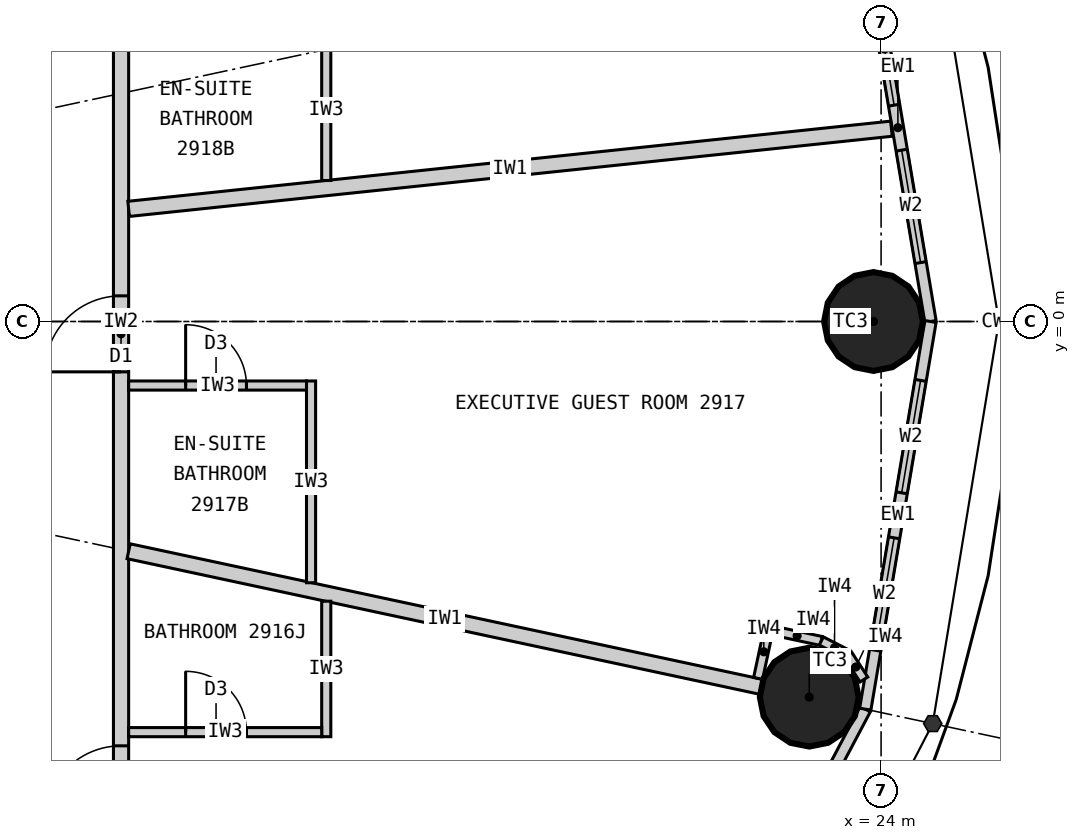
"""IFC4 building model, lengths in metres.
Left out: names, types, materials, properties, quantities, classifications, styles, units other than length and angle.
Written with IfcOpenShell. Run it as: python <this file> out.ifc"""

import sys

from ifc_helpers import new_model, si_unit, direction, frame, frame_2d, origin, origin_2d, place, context, subcontext, project, spatial, rectangle, circle, extrude, element, fill, save


model = new_model("IFC4")
c1 = context("Model", 3, precision=1e-05, world=origin(), true_north=direction((0.0, 1.0)))
c2 = subcontext(c1, "Body", "Model", "MODEL_VIEW")
j1 = project(units=[si_unit("LENGTHUNIT", "METRE"), si_unit("PLANEANGLEUNIT", "RADIAN")], contexts=[c1])
p1 = place(None, origin())
s1 = spatial("IfcSite", under=j1, at=p1, CompositionType="ELEMENT")
p2 = place(p1, origin())
s2 = spatial("IfcBuilding", under=s1, at=p2, CompositionType="ELEMENT")
p3 = place(p2, frame((0.0, 0.0, 115.5)))
s3 = spatial("IfcBuildingStorey", under=s2, at=p3, CompositionType="ELEMENT", Elevation=115.5)
for number, where, z_axis, x_axis in (
    (1, (23.9, 0.0, 0.0), (0.0, 0.0, 1.0), (1.0, 0.0, 0.0)),
    (2, (23.055, -4.942, 0.0), (0.0, 0.0, 1.0), (1.0, 0.0, 0.0)),
):
    element("IfcColumn", number, at=place(p3, frame(where, z_axis=z_axis, x_axis=x_axis)), inside=s3, PredefinedType="COLUMN", context=c2, shape_type="SweptSolid", body=[
        extrude(circle(Radius=0.65, at=origin_2d()), origin(), (0.0, 0.0, 1.0), 3.3),
    ])
p4 = place(p3, frame((24.65, 0.0, 0.0), z_axis=(0.0, 0.0, 1.0), x_axis=(-0.165883894218, 0.986145290329, 0.0)))
e3 = element("IfcWall", 3, at=p4, inside=s3, PredefinedType="ELEMENTEDWALL", context=c2, shape_type="SweptSolid", body=[
    extrude(rectangle(XDim=5.172, YDim=0.15, at=frame_2d((2.586, 0.0))), origin(), (0.0, 0.0, 1.0), 3.12),
])
p5 = place(p4, frame((0.786, 0.0, 0.9)))
e4 = element("IfcOpeningElement", 4, at=p5, cuts=e3, PredefinedType="OPENING", context=c2, shape_type="SweptSolid", body=[
    extrude(rectangle(XDim=1.5, YDim=1.9, at=frame_2d((0.75, 0.95))), frame((0.0, 0.085, 0.0), z_axis=(0.0, -1.0, 0.0), x_axis=(1.0, 0.0, 0.0)), (0.0, 0.0, 1.0), 0.17),
])
p6 = place(p4, frame((2.886, 0.0, 0.9)))
e5 = element("IfcOpeningElement", 5, at=p6, cuts=e3, PredefinedType="OPENING", context=c2, shape_type="SweptSolid", body=[
    extrude(rectangle(XDim=1.5, YDim=1.9, at=frame_2d((0.75, 0.95))), frame((0.0, 0.085, 0.0), z_axis=(0.0, -1.0, 0.0), x_axis=(1.0, 0.0, 0.0)), (0.0, 0.0, 1.0), 0.17),
])
p7 = place(p3, frame((21.287, -9.832, 0.0), z_axis=(0.0, 0.0, 1.0), x_axis=(0.467814388454, 0.883826735257, 0.0)))
e6 = element("IfcWall", 6, at=p7, inside=s3, PredefinedType="ELEMENTEDWALL", context=c2, shape_type="SweptSolid", body=[
    extrude(rectangle(XDim=5.354, YDim=0.15, at=frame_2d((2.677, 0.0))), origin(), (0.0, 0.0, 1.0), 3.12),
])
p8 = place(p7, frame((0.877, 0.0, 0.9)))
e7 = element("IfcOpeningElement", 7, at=p8, cuts=e6, PredefinedType="OPENING", context=c2, shape_type="SweptSolid", body=[
    extrude(rectangle(XDim=1.5, YDim=1.9, at=frame_2d((0.75, 0.95))), frame((0.0, 0.085, 0.0), z_axis=(0.0, -1.0, 0.0), x_axis=(1.0, 0.0, 0.0)), (0.0, 0.0, 1.0), 0.17),
])
p9 = place(p7, frame((2.977, 0.0, 0.9)))
e8 = element("IfcOpeningElement", 8, at=p9, cuts=e6, PredefinedType="OPENING", context=c2, shape_type="SweptSolid", body=[
    extrude(rectangle(XDim=1.5, YDim=1.9, at=frame_2d((0.75, 0.95))), frame((0.0, 0.085, 0.0), z_axis=(0.0, -1.0, 0.0), x_axis=(1.0, 0.0, 0.0)), (0.0, 0.0, 1.0), 0.17),
])
p10 = place(p3, frame((23.792, -5.1, 0.0), z_axis=(0.0, 0.0, 1.0), x_axis=(0.165883894218, 0.986145290329, 0.0)))
e9 = element("IfcWall", 9, at=p10, inside=s3, PredefinedType="ELEMENTEDWALL", context=c2, shape_type="SweptSolid", body=[
    extrude(rectangle(XDim=5.172, YDim=0.15, at=frame_2d((2.586, 0.0))), origin(), (0.0, 0.0, 1.0), 3.12),
])
p11 = place(p10, frame((0.786, 0.0, 0.9)))
e10 = element("IfcOpeningElement", 10, at=p11, cuts=e9, PredefinedType="OPENING", context=c2, shape_type="SweptSolid", body=[
    extrude(rectangle(XDim=1.5, YDim=1.9, at=frame_2d((0.75, 0.95))), frame((0.0, 0.085, 0.0), z_axis=(0.0, -1.0, 0.0), x_axis=(1.0, 0.0, 0.0)), (0.0, 0.0, 1.0), 0.17),
])
p12 = place(p10, frame((2.886, 0.0, 0.9)))
e11 = element("IfcOpeningElement", 11, at=p12, cuts=e9, PredefinedType="OPENING", context=c2, shape_type="SweptSolid", body=[
    extrude(rectangle(XDim=1.5, YDim=1.9, at=frame_2d((0.75, 0.95))), frame((0.0, 0.085, 0.0), z_axis=(0.0, -1.0, 0.0), x_axis=(1.0, 0.0, 0.0)), (0.0, 0.0, 1.0), 0.17),
])
p13 = place(p3, frame((14.0, -9.9, 0.0), z_axis=(0.0, 0.0, 1.0), x_axis=(0.0, 1.0, 0.0)))
e12 = element("IfcWall", 12, at=p13, inside=s3, PredefinedType="PARTITIONING", context=c2, shape_type="SweptSolid", body=[
    extrude(rectangle(XDim=19.8, YDim=0.2, at=frame_2d((9.9, 0.0))), origin(), (0.0, 0.0, 1.0), 3.12),
])
p14 = place(p13, frame((3.318, 0.0, 0.0)))
e13 = element("IfcOpeningElement", 13, at=p14, cuts=e12, PredefinedType="OPENING", context=c2, shape_type="SweptSolid", body=[
    extrude(rectangle(XDim=1.0, YDim=2.2, at=frame_2d((0.5, 1.1))), frame((0.0, 0.11, 0.0), z_axis=(0.0, -1.0, 0.0), x_axis=(1.0, 0.0, 0.0)), (0.0, 0.0, 1.0), 0.22),
])
p15 = place(p13, frame((9.238, 0.0, 0.0)))
e14 = element("IfcOpeningElement", 14, at=p15, cuts=e12, PredefinedType="OPENING", context=c2, shape_type="SweptSolid", body=[
    extrude(rectangle(XDim=1.0, YDim=2.2, at=frame_2d((0.5, 1.1))), frame((0.0, 0.11, 0.0), z_axis=(0.0, -1.0, 0.0), x_axis=(1.0, 0.0, 0.0)), (0.0, 0.0, 1.0), 0.22),
])
p16 = place(p13, frame((13.742, 0.0, 0.0)))
e15 = element("IfcOpeningElement", 15, at=p16, cuts=e12, PredefinedType="OPENING", context=c2, shape_type="SweptSolid", body=[
    extrude(rectangle(XDim=1.0, YDim=2.2, at=frame_2d((0.5, 1.1))), frame((0.0, 0.11, 0.0), z_axis=(0.0, -1.0, 0.0), x_axis=(1.0, 0.0, 0.0)), (0.0, 0.0, 1.0), 0.22),
])
p17 = place(p13, frame((18.698, 0.0, 0.0)))
e16 = element("IfcOpeningElement", 16, at=p17, cuts=e12, PredefinedType="OPENING", context=c2, shape_type="SweptSolid", body=[
    extrude(rectangle(XDim=1.0, YDim=2.2, at=frame_2d((0.5, 1.1))), frame((0.0, 0.11, 0.0), z_axis=(0.0, -1.0, 0.0), x_axis=(1.0, 0.0, 0.0)), (0.0, 0.0, 1.0), 0.22),
])
p18 = place(p3, frame((14.1, 1.482, 0.0), z_axis=(0.0, 0.0, 1.0), x_axis=(0.994523202615, 0.104516024894, 0.0)))
e17 = element("IfcWall", 17, at=p18, inside=s3, PredefinedType="PARTITIONING", context=c2, shape_type="SweptSolid", body=[
    extrude(rectangle(XDim=10.091, YDim=0.2, at=frame_2d((5.045, 0.0))), origin(), (0.0, 0.0, 1.0), 2.47),
])
p19 = place(p3, frame((14.1, -3.022, 0.0), z_axis=(0.0, 0.0, 1.0), x_axis=(0.977783513367, -0.209617272638, 0.0)))
e18 = element("IfcWall", 18, at=p19, inside=s3, PredefinedType="PARTITIONING", context=c2, shape_type="SweptSolid", body=[
    extrude(rectangle(XDim=8.508, YDim=0.2, at=frame_2d((4.254, 0.0))), origin(), (0.0, 0.0, 1.0), 2.37),
])
p20 = place(p3, frame((16.7, -3.68, 0.0), z_axis=(0.0, 0.0, 1.0), x_axis=(0.0, -1.0, 0.0)))
e19 = element("IfcWall", 19, at=p20, inside=s3, PredefinedType="PARTITIONING", context=c2, shape_type="SweptSolid", body=[
    extrude(rectangle(XDim=1.783, YDim=0.12, at=frame_2d((0.891, 0.0))), origin(), (0.0, 0.0, 1.0), 3.12),
])
p21 = place(p3, frame((14.1, -5.403, 0.0), z_axis=(0.0, 0.0, 1.0), x_axis=(1.0, 0.0, 0.0)))
e20 = element("IfcWall", 20, at=p21, inside=s3, PredefinedType="PARTITIONING", context=c2, shape_type="SweptSolid", body=[
    extrude(rectangle(XDim=2.54, YDim=0.12, at=frame_2d((1.27, 0.0))), origin(), (0.0, 0.0, 1.0), 3.12),
])
p22 = place(p21, frame((0.75, 0.0, 0.0)))
e21 = element("IfcOpeningElement", 21, at=p22, cuts=e20, PredefinedType="OPENING", context=c2, shape_type="SweptSolid", body=[
    extrude(rectangle(XDim=0.8, YDim=2.1, at=frame_2d((0.4, 1.05))), frame((0.0, 0.07, 0.0), z_axis=(0.0, -1.0, 0.0), x_axis=(1.0, 0.0, 0.0)), (0.0, 0.0, 1.0), 0.14),
])
p23 = place(p3, frame((16.5, -3.437, 0.0), z_axis=(0.0, 0.0, 1.0), x_axis=(0.0, 1.0, 0.0)))
e22 = element("IfcWall", 22, at=p23, inside=s3, PredefinedType="PARTITIONING", context=c2, shape_type="SweptSolid", body=[
    extrude(rectangle(XDim=2.655, YDim=0.12, at=frame_2d((1.327, 0.0))), origin(), (0.0, 0.0, 1.0), 3.12),
])
p24 = place(p3, frame((14.1, -0.843, 0.0), z_axis=(0.0, 0.0, 1.0), x_axis=(1.0, 0.0, 0.0)))
e23 = element("IfcWall", 23, at=p24, inside=s3, PredefinedType="PARTITIONING", context=c2, shape_type="SweptSolid", body=[
    extrude(rectangle(XDim=2.34, YDim=0.12, at=frame_2d((1.17, 0.0))), origin(), (0.0, 0.0, 1.0), 3.12),
])
p25 = place(p24, frame((0.75, 0.0, 0.0)))
e24 = element("IfcOpeningElement", 24, at=p25, cuts=e23, PredefinedType="OPENING", context=c2, shape_type="SweptSolid", body=[
    extrude(rectangle(XDim=0.8, YDim=2.1, at=frame_2d((0.4, 1.05))), frame((0.0, 0.07, 0.0), z_axis=(0.0, -1.0, 0.0), x_axis=(1.0, 0.0, 0.0)), (0.0, 0.0, 1.0), 0.14),
])
p26 = place(p3, frame((16.7, 1.855, 0.0), z_axis=(0.0, 0.0, 1.0), x_axis=(0.0, 1.0, 0.0)))
e25 = element("IfcWall", 25, at=p26, inside=s3, PredefinedType="PARTITIONING", context=c2, shape_type="SweptSolid", body=[
    extrude(rectangle(XDim=1.867, YDim=0.12, at=frame_2d((0.933, 0.0))), origin(), (0.0, 0.0, 1.0), 3.12),
])
p27 = place(p3, frame((22.382, -4.695, 0.0), z_axis=(0.0, 0.0, 1.0), x_axis=(0.209808658628, 0.977742464438, 0.0)))
e26 = element("IfcWall", 26, at=p27, inside=s3, PredefinedType="PARTITIONING", context=c2, shape_type="SweptSolid", body=[
    extrude(rectangle(XDim=0.716, YDim=0.12, at=frame_2d((0.358, 0.0))), origin(), (0.0, 0.0, 1.0), 3.12),
])
p28 = place(p3, frame((22.578, -4.067, 0.0), z_axis=(0.0, 0.0, 1.0), x_axis=(0.977802414077, -0.209529088731, 0.0)))
e27 = element("IfcWall", 27, at=p28, inside=s3, PredefinedType="PARTITIONING", context=c2, shape_type="SweptSolid", body=[
    extrude(rectangle(XDim=0.65, YDim=0.12, at=frame_2d((0.325, 0.0))), origin(), (0.0, 0.0, 1.0), 3.12),
])
for number, where, z_axis, x_axis in (
    (28, (23.213, -4.203, 0.0), (0.0, 0.0, 1.0), (0.89, -0.456, 0.0)),
    (29, (23.562, -4.381, 0.0), (0.0, 0.0, 1.0), (0.543, -0.84, 0.0)),
):
    element("IfcWall", number, at=place(p3, frame(where, z_axis=z_axis, x_axis=x_axis)), inside=s3, PredefinedType="PARTITIONING", context=c2, shape_type="SweptSolid", body=[
        extrude(rectangle(XDim=0.391, YDim=0.12, at=frame_2d((0.196, 0.0))), origin(), (0.0, 0.0, 1.0), 3.12),
    ])
p29 = place(p5, origin())
e30 = element("IfcWindow", 30, at=p29, inside=s3, PartitioningType="SINGLE_PANEL", PredefinedType="WINDOW", context=c2, shape_type="SweptSolid", body=[
    extrude(rectangle(XDim=1.5, YDim=1.9, at=frame_2d((0.75, 0.95))), frame((0.0, 0.03, 0.0), z_axis=(0.0, -1.0, 0.0), x_axis=(1.0, 0.0, 0.0)), (0.0, 0.0, 1.0), 0.06),
])
fill(e4, e30)
p30 = place(p6, origin())
e31 = element("IfcWindow", 31, at=p30, inside=s3, PartitioningType="SINGLE_PANEL", PredefinedType="WINDOW", context=c2, shape_type="SweptSolid", body=[
    extrude(rectangle(XDim=1.5, YDim=1.9, at=frame_2d((0.75, 0.95))), frame((0.0, 0.03, 0.0), z_axis=(0.0, -1.0, 0.0), x_axis=(1.0, 0.0, 0.0)), (0.0, 0.0, 1.0), 0.06),
])
fill(e5, e31)
p31 = place(p11, origin())
e32 = element("IfcWindow", 32, at=p31, inside=s3, PartitioningType="SINGLE_PANEL", PredefinedType="WINDOW", context=c2, shape_type="SweptSolid", body=[
    extrude(rectangle(XDim=1.5, YDim=1.9, at=frame_2d((0.75, 0.95))), frame((0.0, 0.03, 0.0), z_axis=(0.0, -1.0, 0.0), x_axis=(1.0, 0.0, 0.0)), (0.0, 0.0, 1.0), 0.06),
])
fill(e10, e32)
p32 = place(p12, origin())
e33 = element("IfcWindow", 33, at=p32, inside=s3, PartitioningType="SINGLE_PANEL", PredefinedType="WINDOW", context=c2, shape_type="SweptSolid", body=[
    extrude(rectangle(XDim=1.5, YDim=1.9, at=frame_2d((0.75, 0.95))), frame((0.0, 0.03, 0.0), z_axis=(0.0, -1.0, 0.0), x_axis=(1.0, 0.0, 0.0)), (0.0, 0.0, 1.0), 0.06),
])
fill(e11, e33)
p33 = place(p22, origin())
e34 = element("IfcDoor", 34, at=p33, inside=s3, OperationType="SINGLE_SWING_LEFT", PredefinedType="DOOR", context=c2, shape_type="SweptSolid", body=[
    extrude(rectangle(XDim=0.8, YDim=2.1, at=frame_2d((0.4, 1.05))), frame((0.0, 0.025, 0.0), z_axis=(0.0, -1.0, 0.0), x_axis=(1.0, 0.0, 0.0)), (0.0, 0.0, 1.0), 0.05),
])
fill(e21, e34)
p34 = place(p14, origin())
e35 = element("IfcDoor", 35, at=p34, inside=s3, OperationType="SINGLE_SWING_LEFT", PredefinedType="DOOR", context=c2, shape_type="SweptSolid", body=[
    extrude(rectangle(XDim=1.0, YDim=2.2, at=frame_2d((0.5, 1.1))), frame((0.0, 0.025, 0.0), z_axis=(0.0, -1.0, 0.0), x_axis=(1.0, 0.0, 0.0)), (0.0, 0.0, 1.0), 0.05),
])
fill(e13, e35)
p35 = place(p25, origin())
e36 = element("IfcDoor", 36, at=p35, inside=s3, OperationType="SINGLE_SWING_LEFT", PredefinedType="DOOR", context=c2, shape_type="SweptSolid", body=[
    extrude(rectangle(XDim=0.8, YDim=2.1, at=frame_2d((0.4, 1.05))), frame((0.0, 0.025, 0.0), z_axis=(0.0, -1.0, 0.0), x_axis=(1.0, 0.0, 0.0)), (0.0, 0.0, 1.0), 0.05),
])
fill(e24, e36)
p36 = place(p15, origin())
e37 = element("IfcDoor", 37, at=p36, inside=s3, OperationType="SINGLE_SWING_LEFT", PredefinedType="DOOR", context=c2, shape_type="SweptSolid", body=[
    extrude(rectangle(XDim=1.0, YDim=2.2, at=frame_2d((0.5, 1.1))), frame((0.0, 0.025, 0.0), z_axis=(0.0, -1.0, 0.0), x_axis=(1.0, 0.0, 0.0)), (0.0, 0.0, 1.0), 0.05),
])
fill(e14, e37)
save(model, sys.argv[1])
